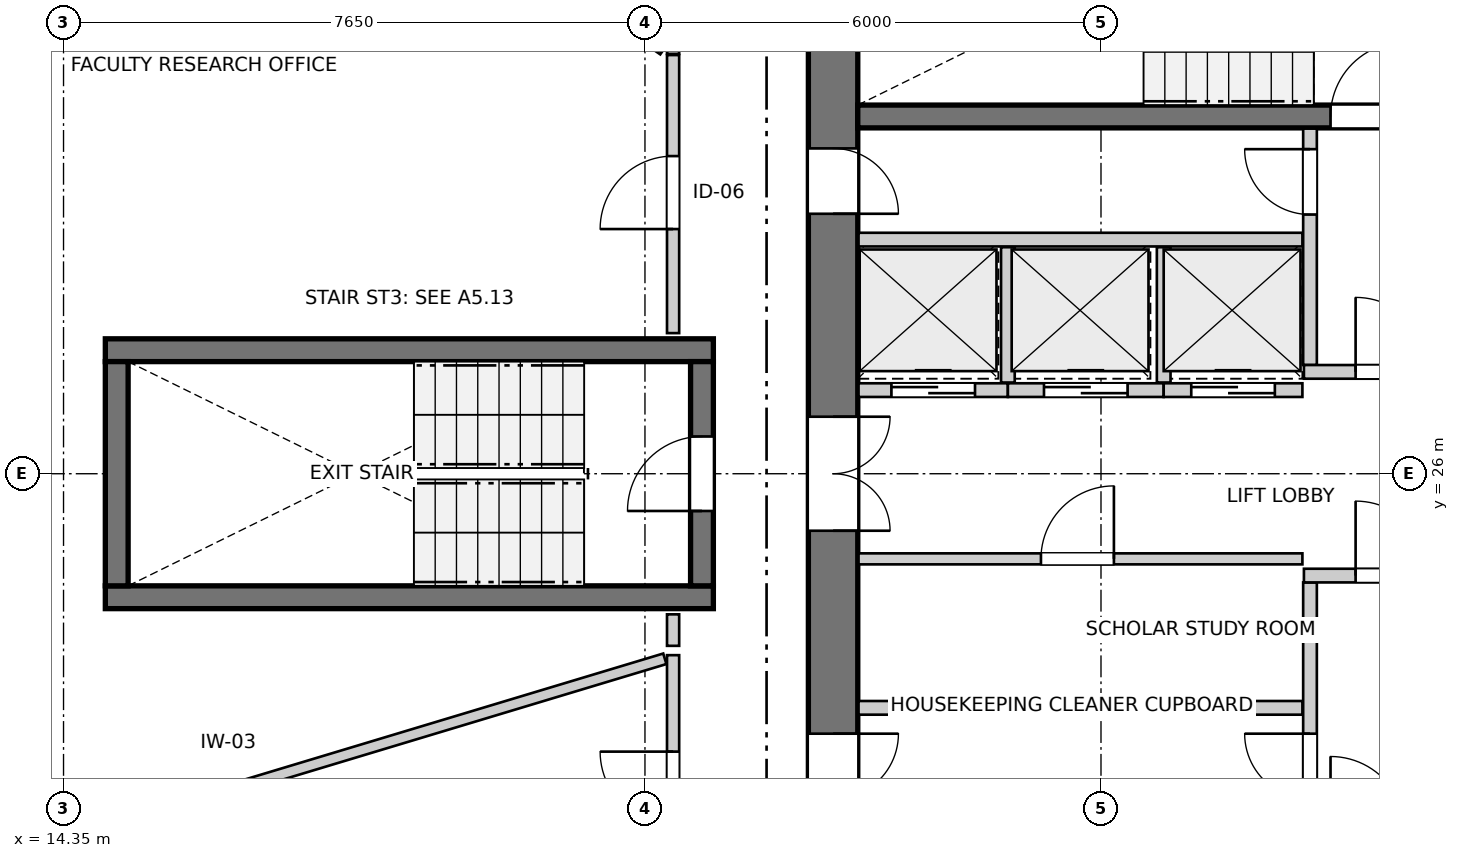
"""IFC4 building model, lengths in metres.
Left out: names, types, materials, properties, quantities, classifications, styles, units other than length and angle.
Written with IfcOpenShell. Run it as: python <this file> out.ifc"""

import sys

from ifc_helpers import new_model, si_unit, direction, frame, frame_2d, origin, place, context, subcontext, project, spatial, rectangle, extrude, source, transform, mapped, element, fill, save


model = new_model("IFC4")
c1 = context("Model", 3, precision=1e-05, world=origin(), true_north=direction((0.0, 1.0)))
c2 = subcontext(c1, "Body", "Model", "MODEL_VIEW")
j1 = project(units=[si_unit("LENGTHUNIT", "METRE"), si_unit("PLANEANGLEUNIT", "RADIAN")], contexts=[c1])
p1 = place(None, origin())
s1 = spatial("IfcSite", under=j1, at=p1, CompositionType="ELEMENT")
p2 = place(p1, origin())
s2 = spatial("IfcBuilding", under=s1, at=p2, CompositionType="ELEMENT")
p3 = place(p2, frame((0.0, 0.0, 139.4)))
s3 = spatial("IfcBuildingStorey", under=s2, at=p3, CompositionType="ELEMENT", Elevation=139.4)
p4 = place(p3, frame((24.475, 33.8, 0.0), z_axis=(0.0, 0.0, 1.0), x_axis=(0.0, -1.0, 0.0)))
e1 = element("IfcWall", 1, at=p4, inside=s3, PredefinedType="SHEAR", context=c2, shape_type="SweptSolid", body=[
    extrude(rectangle(XDim=15.6, YDim=0.65, at=frame_2d((7.8, 0.0))), origin(), (0.0, 0.0, 1.0), 2.95),
])
p5 = place(p4, frame((7.05, 0.0, 0.0)))
e2 = element("IfcOpeningElement", 2, at=p5, cuts=e1, PredefinedType="OPENING", context=c2, shape_type="SweptSolid", body=[
    extrude(rectangle(XDim=1.5, YDim=2.15, at=frame_2d((0.75, 1.075))), frame((0.0, 0.335, 0.0), z_axis=(0.0, -1.0, 0.0), x_axis=(1.0, 0.0, 0.0)), (0.0, 0.0, 1.0), 0.67),
])
p6 = place(p4, frame((3.52, 0.0, 0.0)))
e3 = element("IfcOpeningElement", 3, at=p6, cuts=e1, PredefinedType="OPENING", context=c2, shape_type="SweptSolid", body=[
    extrude(rectangle(XDim=0.86, YDim=2.05, at=frame_2d((0.43, 1.025))), frame((0.0, 0.335, 0.0), z_axis=(0.0, -1.0, 0.0), x_axis=(1.0, 0.0, 0.0)), (0.0, 0.0, 1.0), 0.67),
])
p7 = place(p4, frame((11.22, 0.0, 0.0)))
e4 = element("IfcOpeningElement", 4, at=p7, cuts=e1, PredefinedType="OPENING", context=c2, shape_type="SweptSolid", body=[
    extrude(rectangle(XDim=0.86, YDim=2.05, at=frame_2d((0.43, 1.025))), frame((0.0, 0.335, 0.0), z_axis=(0.0, -1.0, 0.0), x_axis=(1.0, 0.0, 0.0)), (0.0, 0.0, 1.0), 0.67),
])
p8 = place(p3, frame((24.8, 30.7, 0.0), z_axis=(0.0, 0.0, 1.0), x_axis=(1.0, 0.0, 0.0)))
e5 = element("IfcWall", 5, at=p8, inside=s3, PredefinedType="SHEAR", context=c2, shape_type="SweptSolid", body=[
    extrude(rectangle(XDim=11.1, YDim=0.3, at=frame_2d((5.55, 0.0))), origin(), (0.0, 0.0, 1.0), 2.95),
])
p9 = place(p8, frame((6.22, 0.0, 0.0)))
e6 = element("IfcOpeningElement", 6, at=p9, cuts=e5, PredefinedType="OPENING", context=c2, shape_type="SweptSolid", body=[
    extrude(rectangle(XDim=0.98, YDim=2.15, at=frame_2d((0.49, 1.075))), frame((0.0, 0.16, 0.0), z_axis=(0.0, -1.0, 0.0), x_axis=(1.0, 0.0, 0.0)), (0.0, 0.0, 1.0), 0.32),
])
p10 = place(p8, frame((9.15, 0.0, 0.0)))
e7 = element("IfcOpeningElement", 7, at=p10, cuts=e5, PredefinedType="OPENING", context=c2, shape_type="SweptSolid", body=[
    extrude(rectangle(XDim=1.15, YDim=2.15, at=frame_2d((0.575, 1.075))), frame((0.0, 0.16, 0.0), z_axis=(0.0, -1.0, 0.0), x_axis=(1.0, 0.0, 0.0)), (0.0, 0.0, 1.0), 0.32),
])
for number, where, z_axis, x_axis in (
    (8, (14.9, 24.375, 0.0), (0.0, 0.0, 1.0), (1.0, 0.0, 0.0)),
    (9, (22.9, 27.625, 0.0), (0.0, 0.0, 1.0), (-1.0, 0.0, 0.0)),
):
    element("IfcWall", number, at=place(p3, frame(where, z_axis=z_axis, x_axis=x_axis)), inside=s3, PredefinedType="SHEAR", context=c2, shape_type="SweptSolid", body=[
        extrude(rectangle(XDim=8.0, YDim=0.3, at=frame_2d((4.0, 0.0))), origin(), (0.0, 0.0, 1.0), 2.95),
    ])
p11 = place(p3, frame((15.05, 27.475, 0.0), z_axis=(0.0, 0.0, 1.0), x_axis=(0.0, -1.0, 0.0)))
e10 = element("IfcWall", 10, at=p11, inside=s3, PredefinedType="SHEAR", context=c2, shape_type="SweptSolid", body=[
    extrude(rectangle(XDim=2.95, YDim=0.3, at=frame_2d((1.475, 0.0))), origin(), (0.0, 0.0, 1.0), 2.95),
])
p12 = place(p3, frame((22.75, 24.525, 0.0), z_axis=(0.0, 0.0, 1.0), x_axis=(0.0, 1.0, 0.0)))
e11 = element("IfcWall", 11, at=p12, inside=s3, PredefinedType="SHEAR", context=c2, shape_type="SweptSolid", body=[
    extrude(rectangle(XDim=2.95, YDim=0.3, at=frame_2d((1.475, 0.0))), origin(), (0.0, 0.0, 1.0), 2.95),
])
p13 = place(p12, frame((0.985, 0.0, 0.0)))
e12 = element("IfcOpeningElement", 12, at=p13, cuts=e11, PredefinedType="OPENING", context=c2, shape_type="SweptSolid", body=[
    extrude(rectangle(XDim=0.98, YDim=2.15, at=frame_2d((0.49, 1.075))), frame((0.0, 0.16, 0.0), z_axis=(0.0, -1.0, 0.0), x_axis=(1.0, 0.0, 0.0)), (0.0, 0.0, 1.0), 0.32),
])
p14 = place(p3, frame((30.75, 21.46, 0.0), z_axis=(0.0, 0.0, 1.0), x_axis=(0.0, 1.0, 0.0)))
e13 = element("IfcWall", 13, at=p14, inside=s3, PredefinedType="PARTITIONING", context=c2, shape_type="SweptSolid", body=[
    extrude(rectangle(XDim=3.11, YDim=0.18, at=frame_2d((1.555, 0.0))), origin(), (0.0, 0.0, 1.0), 2.95),
])
p15 = place(p14, frame((0.26, 0.0, 0.0)))
e14 = element("IfcOpeningElement", 14, at=p15, cuts=e13, PredefinedType="OPENING", context=c2, shape_type="SweptSolid", body=[
    extrude(rectangle(XDim=0.86, YDim=2.05, at=frame_2d((0.43, 1.025))), frame((0.0, 0.1, 0.0), z_axis=(0.0, -1.0, 0.0), x_axis=(1.0, 0.0, 0.0)), (0.0, 0.0, 1.0), 0.2),
])
p16 = place(p3, frame((30.67, 24.66, 0.0), z_axis=(0.0, 0.0, 1.0), x_axis=(1.0, 0.0, 0.0)))
e15 = element("IfcWall", 15, at=p16, inside=s3, PredefinedType="PARTITIONING", context=c2, shape_type="SweptSolid", body=[
    extrude(rectangle(XDim=5.22, YDim=0.18, at=frame_2d((2.61, 0.0))), origin(), (0.0, 0.0, 1.0), 2.95),
])
p17 = place(p16, frame((0.68, 0.0, 0.0)))
e16 = element("IfcOpeningElement", 16, at=p17, cuts=e15, PredefinedType="OPENING", context=c2, shape_type="SweptSolid", body=[
    extrude(rectangle(XDim=0.98, YDim=2.15, at=frame_2d((0.49, 1.075))), frame((0.0, 0.1, 0.0), z_axis=(0.0, -1.0, 0.0), x_axis=(1.0, 0.0, 0.0)), (0.0, 0.0, 1.0), 0.2),
])
p18 = place(p3, frame((30.75, 27.43, 0.0), z_axis=(0.0, 0.0, 1.0), x_axis=(0.0, 1.0, 0.0)))
e17 = element("IfcWall", 17, at=p18, inside=s3, PredefinedType="PARTITIONING", context=c2, shape_type="SweptSolid", body=[
    extrude(rectangle(XDim=3.11, YDim=0.18, at=frame_2d((1.555, 0.0))), origin(), (0.0, 0.0, 1.0), 2.95),
])
p19 = place(p18, frame((1.98, 0.0, 0.0)))
e18 = element("IfcOpeningElement", 18, at=p19, cuts=e17, PredefinedType="OPENING", context=c2, shape_type="SweptSolid", body=[
    extrude(rectangle(XDim=0.86, YDim=2.05, at=frame_2d((0.43, 1.025))), frame((0.0, 0.1, 0.0), z_axis=(0.0, -1.0, 0.0), x_axis=(1.0, 0.0, 0.0)), (0.0, 0.0, 1.0), 0.2),
])
p20 = place(p3, frame((30.67, 27.34, 0.0), z_axis=(0.0, 0.0, 1.0), x_axis=(1.0, 0.0, 0.0)))
e19 = element("IfcWall", 19, at=p20, inside=s3, PredefinedType="PARTITIONING", context=c2, shape_type="SweptSolid", body=[
    extrude(rectangle(XDim=5.22, YDim=0.18, at=frame_2d((2.61, 0.0))), origin(), (0.0, 0.0, 1.0), 2.95),
])
p21 = place(p20, frame((0.68, 0.0, 0.0)))
e20 = element("IfcOpeningElement", 20, at=p21, cuts=e19, PredefinedType="OPENING", context=c2, shape_type="SweptSolid", body=[
    extrude(rectangle(XDim=0.98, YDim=2.15, at=frame_2d((0.49, 1.075))), frame((0.0, 0.1, 0.0), z_axis=(0.0, -1.0, 0.0), x_axis=(1.0, 0.0, 0.0)), (0.0, 0.0, 1.0), 0.2),
])
p22 = place(p3, frame((24.81, 22.92, 0.0), z_axis=(0.0, 0.0, 1.0), x_axis=(1.0, 0.0, 0.0)))
e21 = element("IfcWall", 21, at=p22, inside=s3, PredefinedType="PARTITIONING", context=c2, shape_type="SweptSolid", body=[
    extrude(rectangle(XDim=5.84, YDim=0.18, at=frame_2d((2.92, 0.0))), origin(), (0.0, 0.0, 1.0), 2.95),
])
p23 = place(p3, frame((24.81, 24.88, 0.0), z_axis=(0.0, 0.0, 1.0), x_axis=(1.0, 0.0, 0.0)))
e22 = element("IfcWall", 22, at=p23, inside=s3, PredefinedType="PARTITIONING", context=c2, shape_type="SweptSolid", body=[
    extrude(rectangle(XDim=5.84, YDim=0.145, at=frame_2d((2.92, 0.0))), origin(), (0.0, 0.0, 1.0), 2.95),
])
p24 = place(p23, frame((2.4, 0.0, 0.0)))
e23 = element("IfcOpeningElement", 23, at=p24, cuts=e22, PredefinedType="OPENING", context=c2, shape_type="SweptSolid", body=[
    extrude(rectangle(XDim=0.96, YDim=2.1, at=frame_2d((0.48, 1.05))), frame((0.0, 0.083, 0.0), z_axis=(0.0, -1.0, 0.0), x_axis=(1.0, 0.0, 0.0)), (0.0, 0.0, 1.0), 0.165),
])
p25 = place(p3, frame((24.81, 29.08, 0.0), z_axis=(0.0, 0.0, 1.0), x_axis=(1.0, 0.0, 0.0)))
e24 = element("IfcWall", 24, at=p25, inside=s3, PredefinedType="PARTITIONING", context=c2, shape_type="SweptSolid", body=[
    extrude(rectangle(XDim=5.84, YDim=0.18, at=frame_2d((2.92, 0.0))), origin(), (0.0, 0.0, 1.0), 2.95),
])
p26 = place(p3, frame((24.81, 27.1, 0.0), z_axis=(0.0, 0.0, 1.0), x_axis=(1.0, 0.0, 0.0)))
e25 = element("IfcWall", 25, at=p26, inside=s3, PredefinedType="PARTITIONING", context=c2, shape_type="SweptSolid", body=[
    extrude(rectangle(XDim=1.965, YDim=0.18, at=frame_2d((0.982, 0.0))), origin(), (0.0, 0.0, 1.0), 2.95),
])
p27 = place(p26, frame((0.433, 0.0, 0.0)))
e26 = element("IfcOpeningElement", 26, at=p27, cuts=e25, PredefinedType="OPENING", context=c2, shape_type="SweptSolid", body=[
    extrude(rectangle(XDim=1.1, YDim=2.15, at=frame_2d((0.55, 1.075))), frame((0.0, 0.1, 0.0), z_axis=(0.0, -1.0, 0.0), x_axis=(1.0, 0.0, 0.0)), (0.0, 0.0, 1.0), 0.2),
])
p28 = place(p3, frame((26.775, 27.1, 0.0), z_axis=(0.0, 0.0, 1.0), x_axis=(1.0, 0.0, 0.0)))
e27 = element("IfcWall", 27, at=p28, inside=s3, PredefinedType="PARTITIONING", context=c2, shape_type="SweptSolid", body=[
    extrude(rectangle(XDim=2.05, YDim=0.18, at=frame_2d((1.025, 0.0))), origin(), (0.0, 0.0, 1.0), 2.95),
])
p29 = place(p28, frame((0.475, 0.0, 0.0)))
e28 = element("IfcOpeningElement", 28, at=p29, cuts=e27, PredefinedType="OPENING", context=c2, shape_type="SweptSolid", body=[
    extrude(rectangle(XDim=1.1, YDim=2.15, at=frame_2d((0.55, 1.075))), frame((0.0, 0.1, 0.0), z_axis=(0.0, -1.0, 0.0), x_axis=(1.0, 0.0, 0.0)), (0.0, 0.0, 1.0), 0.2),
])
p30 = place(p3, frame((26.775, 27.2, 0.0), z_axis=(0.0, 0.0, 1.0), x_axis=(0.0, 1.0, 0.0)))
e29 = element("IfcWall", 29, at=p30, inside=s3, PredefinedType="PARTITIONING", context=c2, shape_type="SweptSolid", body=[
    extrude(rectangle(XDim=1.78, YDim=0.18, at=frame_2d((0.89, 0.0))), origin(), (0.0, 0.0, 1.0), 2.95),
])
p31 = place(p3, frame((28.825, 27.1, 0.0), z_axis=(0.0, 0.0, 1.0), x_axis=(1.0, 0.0, 0.0)))
e30 = element("IfcWall", 30, at=p31, inside=s3, PredefinedType="PARTITIONING", context=c2, shape_type="SweptSolid", body=[
    extrude(rectangle(XDim=1.825, YDim=0.18, at=frame_2d((0.913, 0.0))), origin(), (0.0, 0.0, 1.0), 2.95),
])
p32 = place(p31, frame((0.363, 0.0, 0.0)))
e31 = element("IfcOpeningElement", 31, at=p32, cuts=e30, PredefinedType="OPENING", context=c2, shape_type="SweptSolid", body=[
    extrude(rectangle(XDim=1.1, YDim=2.15, at=frame_2d((0.55, 1.075))), frame((0.0, 0.1, 0.0), z_axis=(0.0, -1.0, 0.0), x_axis=(1.0, 0.0, 0.0)), (0.0, 0.0, 1.0), 0.2),
])
p33 = place(p3, frame((28.825, 27.2, 0.0), z_axis=(0.0, 0.0, 1.0), x_axis=(0.0, 1.0, 0.0)))
e32 = element("IfcWall", 32, at=p33, inside=s3, PredefinedType="PARTITIONING", context=c2, shape_type="SweptSolid", body=[
    extrude(rectangle(XDim=1.78, YDim=0.18, at=frame_2d((0.89, 0.0))), origin(), (0.0, 0.0, 1.0), 2.95),
])
p34 = place(p3, frame((22.37, 27.85, 0.0), z_axis=(0.0, 0.0, 1.0), x_axis=(0.0, 1.0, 0.0)))
e33 = element("IfcWall", 33, at=p34, inside=s3, PredefinedType="PARTITIONING", context=c2, shape_type="SweptSolid", body=[
    extrude(rectangle(XDim=3.658, YDim=0.16, at=frame_2d((1.829, 0.0))), origin(), (0.0, 0.0, 1.0), 2.95),
])
p35 = place(p34, frame((1.369, 0.0, 0.0)))
e34 = element("IfcOpeningElement", 34, at=p35, cuts=e33, PredefinedType="OPENING", context=c2, shape_type="SweptSolid", body=[
    extrude(rectangle(XDim=0.96, YDim=2.1, at=frame_2d((0.48, 1.05))), frame((0.0, 0.09, 0.0), z_axis=(0.0, -1.0, 0.0), x_axis=(1.0, 0.0, 0.0)), (0.0, 0.0, 1.0), 0.18),
])
p36 = place(p3, frame((22.37, 20.163, 0.0), z_axis=(0.0, 0.0, 1.0), x_axis=(0.0, 1.0, 0.0)))
e35 = element("IfcWall", 35, at=p36, inside=s3, PredefinedType="PARTITIONING", context=c2, shape_type="SweptSolid", body=[
    extrude(rectangle(XDim=3.45, YDim=0.16, at=frame_2d((1.725, 0.0))), origin(), (0.0, 0.0, 1.0), 2.95),
])
p37 = place(p36, frame((1.221, 0.0, 0.0)))
e36 = element("IfcOpeningElement", 36, at=p37, cuts=e35, PredefinedType="OPENING", context=c2, shape_type="SweptSolid", body=[
    extrude(rectangle(XDim=0.96, YDim=2.1, at=frame_2d((0.48, 1.05))), frame((0.0, 0.09, 0.0), z_axis=(0.0, -1.0, 0.0), x_axis=(1.0, 0.0, 0.0)), (0.0, 0.0, 1.0), 0.18),
])
p38 = place(p3, frame((22.37, 31.523, 0.0), z_axis=(0.0, 0.0, 1.0), x_axis=(0.0, 1.0, 0.0)))
e37 = element("IfcWall", 37, at=p38, inside=s3, PredefinedType="PARTITIONING", context=c2, shape_type="SweptSolid", body=[
    extrude(rectangle(XDim=2.927, YDim=0.16, at=frame_2d((1.463, 0.0))), origin(), (0.0, 0.0, 1.0), 2.95),
])
p39 = place(p38, frame((0.967, 0.0, 0.0)))
e38 = element("IfcOpeningElement", 38, at=p39, cuts=e37, PredefinedType="OPENING", context=c2, shape_type="SweptSolid", body=[
    extrude(rectangle(XDim=0.96, YDim=2.1, at=frame_2d((0.48, 1.05))), frame((0.0, 0.09, 0.0), z_axis=(0.0, -1.0, 0.0), x_axis=(1.0, 0.0, 0.0)), (0.0, 0.0, 1.0), 0.18),
])
p40 = place(p3, frame((11.113, 20.208, 0.0), z_axis=(0.0, 0.0, 1.0), x_axis=(0.957541878855, 0.288294207778, 0.0)))
e39 = element("IfcWall", 39, at=p40, inside=s3, PredefinedType="PARTITIONING", context=c2, shape_type="SweptSolid", body=[
    extrude(rectangle(XDim=11.643, YDim=0.145, at=frame_2d((5.822, 0.0))), origin(), (0.0, 0.0, 1.0), 2.95),
])
p41 = place(p3, frame((15.677, 36.094, 0.0), z_axis=(0.0, 0.0, 1.0), x_axis=(0.823863992983, -0.566787544911, 0.0)))
e40 = element("IfcWall", 40, at=p41, inside=s3, PredefinedType="PARTITIONING", context=c2, shape_type="SweptSolid", body=[
    extrude(rectangle(XDim=7.969, YDim=0.145, at=frame_2d((3.984, 0.0))), origin(), (0.0, 0.0, 1.0), 2.95),
])
p42 = place(p3, frame((22.37, 23.736, 0.0), z_axis=(0.0, 0.0, 1.0), x_axis=(0.0, 1.0, 0.0)))
e41 = element("IfcWall", 41, at=p42, inside=s3, PredefinedType="PARTITIONING", context=c2, shape_type="SweptSolid", body=[
    extrude(rectangle(XDim=0.414, YDim=0.16, at=frame_2d((0.207, 0.0))), origin(), (0.0, 0.0, 1.0), 2.95),
])
m1 = source(origin(), c2, "Body", "SweptSolid", [
    extrude(rectangle(XDim=0.98, YDim=2.15, at=frame_2d((0.49, 1.075))), frame((0.0, 0.025, 0.0), z_axis=(0.0, -1.0, 0.0), x_axis=(1.0, 0.0, 0.0)), (0.0, 0.0, 1.0), 0.05),
])
p43 = place(p9, origin())
e42 = element("IfcDoor", 42, at=p43, inside=s3, OperationType="SINGLE_SWING_RIGHT", PredefinedType="DOOR", context=c2, shape_type="MappedRepresentation", body=[
    mapped(m1, transform((0.0, 0.0, 0.0), x_axis=(1.0, 0.0, 0.0), y_axis=(0.0, 1.0, 0.0), z_axis=(0.0, 0.0, 1.0), scale=1.0)),
])
fill(e6, e42)
p44 = place(p13, origin())
e43 = element("IfcDoor", 43, at=p44, inside=s3, OperationType="SINGLE_SWING_LEFT", PredefinedType="DOOR", context=c2, shape_type="MappedRepresentation", body=[
    mapped(m1, transform((0.0, 0.0, 0.0), x_axis=(1.0, 0.0, 0.0), y_axis=(0.0, 1.0, 0.0), z_axis=(0.0, 0.0, 1.0), scale=1.0)),
])
fill(e12, e43)
m2 = source(origin(), c2, "Body", "SweptSolid", [
    extrude(rectangle(XDim=1.5, YDim=2.15, at=frame_2d((0.75, 1.075))), frame((0.0, 0.025, 0.0), z_axis=(0.0, -1.0, 0.0), x_axis=(1.0, 0.0, 0.0)), (0.0, 0.0, 1.0), 0.05),
])
p45 = place(p5, origin())
e44 = element("IfcDoor", 44, at=p45, inside=s3, OperationType="DOUBLE_DOOR_SINGLE_SWING", PredefinedType="DOOR", context=c2, shape_type="MappedRepresentation", body=[
    mapped(m2, transform((0.0, 0.0, 0.0), x_axis=(1.0, 0.0, 0.0), y_axis=(0.0, 1.0, 0.0), z_axis=(0.0, 0.0, 1.0), scale=1.0)),
])
fill(e2, e44)
m3 = source(origin(), c2, "Body", "SweptSolid", [
    extrude(rectangle(XDim=0.86, YDim=2.05, at=frame_2d((0.43, 1.025))), frame((0.0, 0.025, 0.0), z_axis=(0.0, -1.0, 0.0), x_axis=(1.0, 0.0, 0.0)), (0.0, 0.0, 1.0), 0.05),
])
p46 = place(p6, origin())
e45 = element("IfcDoor", 45, at=p46, inside=s3, OperationType="SINGLE_SWING_RIGHT", PredefinedType="DOOR", context=c2, shape_type="MappedRepresentation", body=[
    mapped(m3, transform((0.0, 0.0, 0.0), x_axis=(1.0, 0.0, 0.0), y_axis=(0.0, 1.0, 0.0), z_axis=(0.0, 0.0, 1.0), scale=1.0)),
])
fill(e3, e45)
p47 = place(p7, origin())
e46 = element("IfcDoor", 46, at=p47, inside=s3, OperationType="SINGLE_SWING_LEFT", PredefinedType="DOOR", context=c2, shape_type="MappedRepresentation", body=[
    mapped(m3, transform((0.0, 0.0, 0.0), x_axis=(1.0, 0.0, 0.0), y_axis=(0.0, 1.0, 0.0), z_axis=(0.0, 0.0, 1.0), scale=1.0)),
])
fill(e4, e46)
p48 = place(p15, origin())
e47 = element("IfcDoor", 47, at=p48, inside=s3, OperationType="SINGLE_SWING_RIGHT", PredefinedType="DOOR", context=c2, shape_type="MappedRepresentation", body=[
    mapped(m3, transform((0.0, 0.0, 0.0), x_axis=(1.0, 0.0, 0.0), y_axis=(0.0, 1.0, 0.0), z_axis=(0.0, 0.0, 1.0), scale=1.0)),
])
fill(e14, e47)
p49 = place(p17, origin())
e48 = element("IfcDoor", 48, at=p49, inside=s3, OperationType="SINGLE_SWING_LEFT", PredefinedType="DOOR", context=c2, shape_type="MappedRepresentation", body=[
    mapped(m1, transform((0.0, 0.0, 0.0), x_axis=(1.0, 0.0, 0.0), y_axis=(0.0, 1.0, 0.0), z_axis=(0.0, 0.0, 1.0), scale=1.0)),
])
fill(e16, e48)
p50 = place(p19, origin())
e49 = element("IfcDoor", 49, at=p50, inside=s3, OperationType="SINGLE_SWING_RIGHT", PredefinedType="DOOR", context=c2, shape_type="MappedRepresentation", body=[
    mapped(m3, transform((0.0, 0.0, 0.0), x_axis=(1.0, 0.0, 0.0), y_axis=(0.0, 1.0, 0.0), z_axis=(0.0, 0.0, 1.0), scale=1.0)),
])
fill(e18, e49)
p51 = place(p21, origin())
e50 = element("IfcDoor", 50, at=p51, inside=s3, OperationType="SINGLE_SWING_LEFT", PredefinedType="DOOR", context=c2, shape_type="MappedRepresentation", body=[
    mapped(m1, transform((0.0, 0.0, 0.0), x_axis=(1.0, 0.0, 0.0), y_axis=(0.0, 1.0, 0.0), z_axis=(0.0, 0.0, 1.0), scale=1.0)),
])
fill(e20, e50)
m4 = source(origin(), c2, "Body", "SweptSolid", [
    extrude(rectangle(XDim=0.96, YDim=2.1, at=frame_2d((0.48, 1.05))), frame((0.0, 0.025, 0.0), z_axis=(0.0, -1.0, 0.0), x_axis=(1.0, 0.0, 0.0)), (0.0, 0.0, 1.0), 0.05),
])
p52 = place(p24, origin())
e51 = element("IfcDoor", 51, at=p52, inside=s3, OperationType="SINGLE_SWING_RIGHT", PredefinedType="DOOR", context=c2, shape_type="MappedRepresentation", body=[
    mapped(m4, transform((0.0, 0.0, 0.0), x_axis=(1.0, 0.0, 0.0), y_axis=(0.0, 1.0, 0.0), z_axis=(0.0, 0.0, 1.0), scale=1.0)),
])
fill(e23, e51)
m5 = source(origin(), c2, "Body", "SweptSolid", [
    extrude(rectangle(XDim=1.1, YDim=2.15, at=frame_2d((0.55, 1.075))), frame((0.0, 0.025, 0.0), z_axis=(0.0, -1.0, 0.0), x_axis=(1.0, 0.0, 0.0)), (0.0, 0.0, 1.0), 0.05),
])
p53 = place(p27, origin())
e52 = element("IfcDoor", 52, at=p53, inside=s3, OperationType="DOUBLE_DOOR_SLIDING", PredefinedType="DOOR", context=c2, shape_type="MappedRepresentation", body=[
    mapped(m5, transform((0.0, 0.0, 0.0), x_axis=(1.0, 0.0, 0.0), y_axis=(0.0, 1.0, 0.0), z_axis=(0.0, 0.0, 1.0), scale=1.0)),
])
fill(e26, e52)
p54 = place(p29, origin())
e53 = element("IfcDoor", 53, at=p54, inside=s3, OperationType="DOUBLE_DOOR_SLIDING", PredefinedType="DOOR", context=c2, shape_type="MappedRepresentation", body=[
    mapped(m5, transform((0.0, 0.0, 0.0), x_axis=(1.0, 0.0, 0.0), y_axis=(0.0, 1.0, 0.0), z_axis=(0.0, 0.0, 1.0), scale=1.0)),
])
fill(e28, e53)
p55 = place(p32, origin())
e54 = element("IfcDoor", 54, at=p55, inside=s3, OperationType="DOUBLE_DOOR_SLIDING", PredefinedType="DOOR", context=c2, shape_type="MappedRepresentation", body=[
    mapped(m5, transform((0.0, 0.0, 0.0), x_axis=(1.0, 0.0, 0.0), y_axis=(0.0, 1.0, 0.0), z_axis=(0.0, 0.0, 1.0), scale=1.0)),
])
fill(e31, e54)
p56 = place(p35, origin())
e55 = element("IfcDoor", 55, at=p56, inside=s3, OperationType="SINGLE_SWING_LEFT", PredefinedType="DOOR", context=c2, shape_type="MappedRepresentation", body=[
    mapped(m4, transform((0.0, 0.0, 0.0), x_axis=(1.0, 0.0, 0.0), y_axis=(0.0, 1.0, 0.0), z_axis=(0.0, 0.0, 1.0), scale=1.0)),
])
fill(e34, e55)
p57 = place(p37, origin())
e56 = element("IfcDoor", 56, at=p57, inside=s3, OperationType="SINGLE_SWING_RIGHT", PredefinedType="DOOR", context=c2, shape_type="MappedRepresentation", body=[
    mapped(m4, transform((0.0, 0.0, 0.0), x_axis=(1.0, 0.0, 0.0), y_axis=(0.0, 1.0, 0.0), z_axis=(0.0, 0.0, 1.0), scale=1.0)),
])
fill(e36, e56)
save(model, sys.argv[1])
